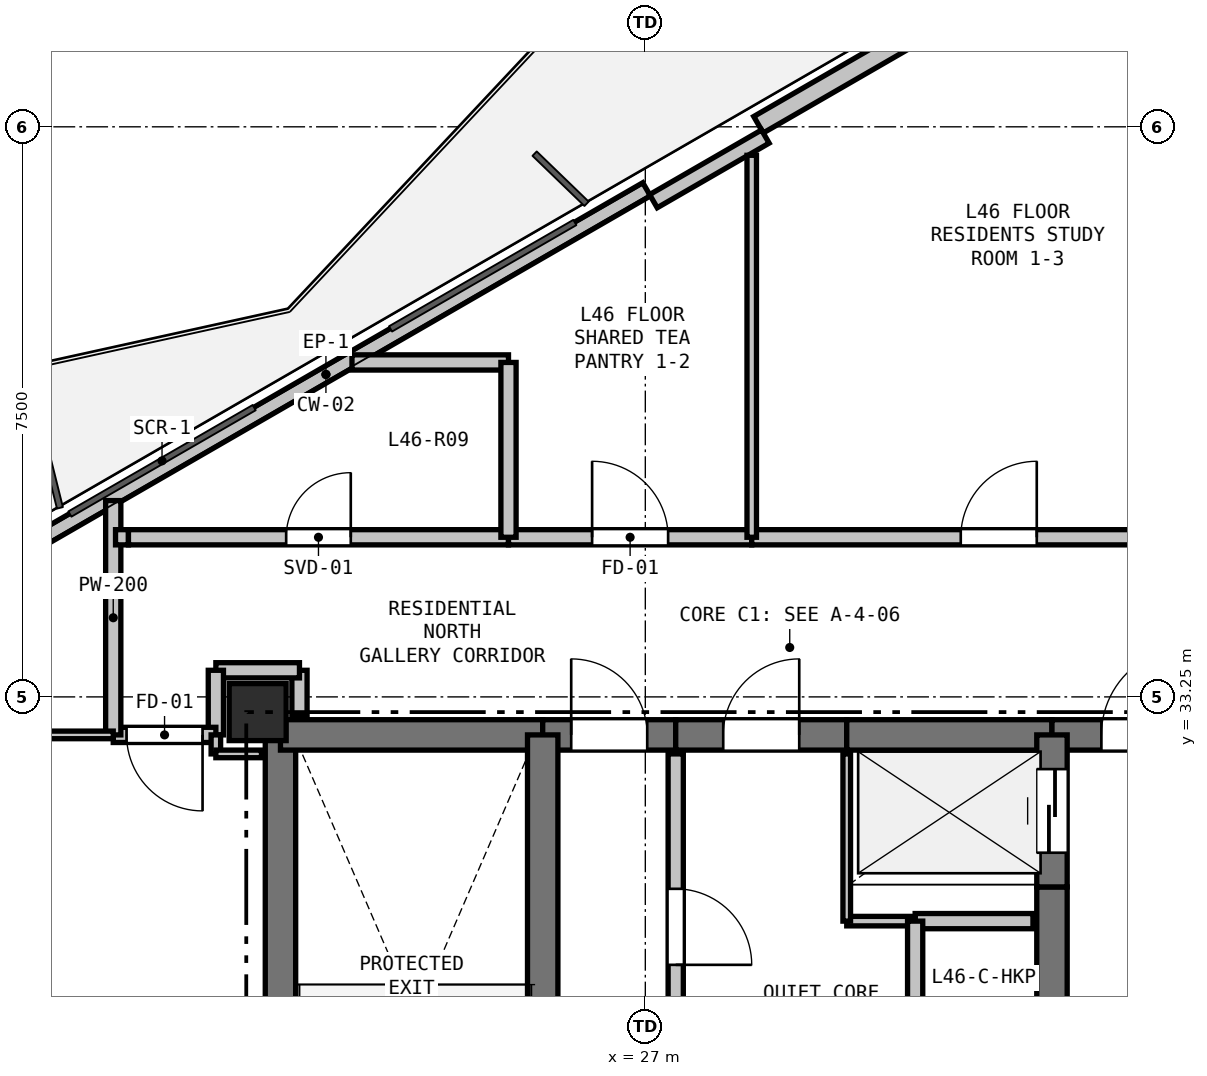
"""IFC4 building model, lengths in metres.
Left out: names, types, materials, properties, quantities, classifications, styles, units other than length and angle.
Written with IfcOpenShell. Run it as: python <this file> out.ifc"""

import sys

from ifc_helpers import new_model, si_unit, direction, frame, frame_2d, origin, origin_2d, place, context, subcontext, project, spatial, rectangle, extrude, element, fill, save


model = new_model("IFC4")
c1 = context("Model", 3, precision=1e-05, world=origin(), true_north=direction((0.0, 1.0)))
c2 = subcontext(c1, "Body", "Model", "MODEL_VIEW")
j1 = project(units=[si_unit("LENGTHUNIT", "METRE"), si_unit("PLANEANGLEUNIT", "RADIAN")], contexts=[c1])
p1 = place(None, origin())
s1 = spatial("IfcSite", under=j1, at=p1, CompositionType="ELEMENT")
p2 = place(p1, origin())
s2 = spatial("IfcBuilding", under=s1, at=p2, CompositionType="ELEMENT")
p3 = place(p2, frame((0.0, 0.0, 167.4)))
s3 = spatial("IfcBuildingStorey", under=s2, at=p3, CompositionType="ELEMENT", Elevation=167.4)
p4 = place(p3, frame((21.9, 33.05, 0.0), z_axis=(0.0, 0.0, 1.0), x_axis=(1.0, 0.0, 0.0)))
e1 = element("IfcColumn", 1, at=p4, inside=s3, PredefinedType="COLUMN", context=c2, shape_type="SweptSolid", body=[
    extrude(rectangle(XDim=0.75, YDim=0.75, at=origin_2d()), origin(), (0.0, 0.0, 1.0), 3.3),
])
p5 = place(p3, frame((18.58, 35.056, 0.0), z_axis=(0.0, 0.0, 1.0), x_axis=(0.866026169916, 0.499998673018, 0.0)))
e2 = element("IfcWall", 2, at=p5, inside=s3, PredefinedType="PARAPET", context=c2, shape_type="SweptSolid", body=[
    extrude(rectangle(XDim=9.742, YDim=0.2, at=frame_2d((4.871, 0.0))), origin(), (0.0, 0.0, 1.0), 0.2),
])
p6 = place(p3, frame((28.489, 40.778, 0.0), z_axis=(0.0, 0.0, 1.0), x_axis=(0.866027516296, 0.499996341005, 0.0)))
e3 = element("IfcWall", 3, at=p6, inside=s3, PredefinedType="SOLIDWALL", context=c2, shape_type="SweptSolid", body=[
    extrude(rectangle(XDim=10.442, YDim=0.25, at=frame_2d((5.221, 0.0))), origin(), (0.0, 0.0, 1.0), 2.64),
])
p7 = place(p6, frame((2.588, 0.0, 0.9)))
e4 = element("IfcOpeningElement", 4, at=p7, cuts=e3, PredefinedType="OPENING", context=c2, shape_type="SweptSolid", body=[
    extrude(rectangle(XDim=1.2, YDim=1.5, at=frame_2d((0.6, 0.75))), frame((0.0, 0.135, 0.0), z_axis=(0.0, -1.0, 0.0), x_axis=(1.0, 0.0, 0.0)), (0.0, 0.0, 1.0), 0.27),
])
p8 = place(p3, frame((27.107, 39.772, 0.0), z_axis=(0.0, 0.0, 1.0), x_axis=(0.866087547558, 0.499892348375, 0.0)))
e5 = element("IfcWall", 5, at=p8, inside=s3, PredefinedType="PARAPET", context=c2, shape_type="SweptSolid", body=[
    extrude(rectangle(XDim=1.7, YDim=0.2, at=frame_2d((0.85, 0.0))), origin(), (0.0, 0.0, 1.0), 2.64),
])
p9 = place(p3, frame((22.2, 25.4, 0.0), z_axis=(0.0, 0.0, 1.0), x_axis=(0.0, 1.0, 0.0)))
e6 = element("IfcWall", 6, at=p9, inside=s3, PredefinedType="SHEAR", context=c2, shape_type="SweptSolid", body=[
    extrude(rectangle(XDim=7.35, YDim=0.4, at=frame_2d((3.675, 0.0))), origin(), (0.0, 0.0, 1.0), 3.02),
])
p10 = place(p3, frame((22.2, 32.75, 0.0), z_axis=(0.0, 0.0, 1.0), x_axis=(1.0, 0.0, 0.0)))
e7 = element("IfcWall", 7, at=p10, inside=s3, PredefinedType="SHEAR", context=c2, shape_type="SweptSolid", body=[
    extrude(rectangle(XDim=3.45, YDim=0.4, at=frame_2d((1.725, 0.0))), origin(), (0.0, 0.0, 1.0), 3.02),
])
p11 = place(p3, frame((25.65, 32.75, 0.0), z_axis=(0.0, 0.0, 1.0), x_axis=(1.0, 0.0, 0.0)))
e8 = element("IfcWall", 8, at=p11, inside=s3, PredefinedType="SHEAR", context=c2, shape_type="SweptSolid", body=[
    extrude(rectangle(XDim=1.75, YDim=0.4, at=frame_2d((0.875, 0.0))), origin(), (0.0, 0.0, 1.0), 3.02),
])
p12 = place(p11, frame((0.375, 0.0, 0.0)))
e9 = element("IfcOpeningElement", 9, at=p12, cuts=e8, PredefinedType="OPENING", context=c2, shape_type="SweptSolid", body=[
    extrude(rectangle(XDim=1.0, YDim=2.15, at=frame_2d((0.5, 1.075))), frame((0.0, 0.21, 0.0), z_axis=(0.0, -1.0, 0.0), x_axis=(1.0, 0.0, 0.0)), (0.0, 0.0, 1.0), 0.42),
])
p13 = place(p3, frame((27.4, 32.75, 0.0), z_axis=(0.0, 0.0, 1.0), x_axis=(1.0, 0.0, 0.0)))
e10 = element("IfcWall", 10, at=p13, inside=s3, PredefinedType="SHEAR", context=c2, shape_type="SweptSolid", body=[
    extrude(rectangle(XDim=2.25, YDim=0.4, at=frame_2d((1.125, 0.0))), origin(), (0.0, 0.0, 1.0), 3.02),
])
p14 = place(p13, frame((0.625, 0.0, 0.0)))
e11 = element("IfcOpeningElement", 11, at=p14, cuts=e10, PredefinedType="OPENING", context=c2, shape_type="SweptSolid", body=[
    extrude(rectangle(XDim=1.0, YDim=2.15, at=frame_2d((0.5, 1.075))), frame((0.0, 0.21, 0.0), z_axis=(0.0, -1.0, 0.0), x_axis=(1.0, 0.0, 0.0)), (0.0, 0.0, 1.0), 0.42),
])
p15 = place(p3, frame((29.65, 32.75, 0.0), z_axis=(0.0, 0.0, 1.0), x_axis=(1.0, 0.0, 0.0)))
e12 = element("IfcWall", 12, at=p15, inside=s3, PredefinedType="SHEAR", context=c2, shape_type="SweptSolid", body=[
    extrude(rectangle(XDim=2.7, YDim=0.4, at=frame_2d((1.35, 0.0))), origin(), (0.0, 0.0, 1.0), 3.02),
])
p16 = place(p3, frame((32.35, 32.75, 0.0), z_axis=(0.0, 0.0, 1.0), x_axis=(1.0, 0.0, 0.0)))
e13 = element("IfcWall", 13, at=p16, inside=s3, PredefinedType="SHEAR", context=c2, shape_type="SweptSolid", body=[
    extrude(rectangle(XDim=3.45, YDim=0.4, at=frame_2d((1.725, 0.0))), origin(), (0.0, 0.0, 1.0), 3.02),
])
p17 = place(p16, frame((0.65, 0.0, 0.0)))
e14 = element("IfcOpeningElement", 14, at=p17, cuts=e13, PredefinedType="OPENING", context=c2, shape_type="SweptSolid", body=[
    extrude(rectangle(XDim=1.15, YDim=2.15, at=frame_2d((0.575, 1.075))), frame((0.0, 0.21, 0.0), z_axis=(0.0, -1.0, 0.0), x_axis=(1.0, 0.0, 0.0)), (0.0, 0.0, 1.0), 0.42),
])
p18 = place(p3, frame((25.65, 27.95, 0.0), z_axis=(0.0, 0.0, 1.0), x_axis=(0.0, 1.0, 0.0)))
e15 = element("IfcWall", 15, at=p18, inside=s3, PredefinedType="SHEAR", context=c2, shape_type="SweptSolid", body=[
    extrude(rectangle(XDim=4.8, YDim=0.4, at=frame_2d((2.4, 0.0))), origin(), (0.0, 0.0, 1.0), 3.02),
])
p19 = place(p3, frame((32.35, 27.95, 0.0), z_axis=(0.0, 0.0, 1.0), x_axis=(0.0, 1.0, 0.0)))
e16 = element("IfcWall", 16, at=p19, inside=s3, PredefinedType="SHEAR", context=c2, shape_type="SweptSolid", body=[
    extrude(rectangle(XDim=2.8, YDim=0.4, at=frame_2d((1.4, 0.0))), origin(), (0.0, 0.0, 1.0), 3.02),
])
p20 = place(p3, frame((32.35, 30.75, 0.0), z_axis=(0.0, 0.0, 1.0), x_axis=(0.0, 1.0, 0.0)))
e17 = element("IfcWall", 17, at=p20, inside=s3, PredefinedType="SHEAR", context=c2, shape_type="SweptSolid", body=[
    extrude(rectangle(XDim=2.0, YDim=0.4, at=frame_2d((1.0, 0.0))), origin(), (0.0, 0.0, 1.0), 3.02),
])
p21 = place(p20, frame((0.45, 0.0, 0.0)))
e18 = element("IfcOpeningElement", 18, at=p21, cuts=e17, PredefinedType="OPENING", context=c2, shape_type="SweptSolid", body=[
    extrude(rectangle(XDim=1.1, YDim=2.15, at=frame_2d((0.55, 1.075))), frame((0.0, 0.21, 0.0), z_axis=(0.0, -1.0, 0.0), x_axis=(1.0, 0.0, 0.0)), (0.0, 0.0, 1.0), 0.42),
])
p22 = place(p3, frame((32.1, 30.3, 0.0), z_axis=(0.0, 0.0, 1.0), x_axis=(-1.0, 0.0, 0.0)))
e19 = element("IfcWall", 19, at=p22, inside=s3, PredefinedType="PARTITIONING", context=c2, shape_type="SweptSolid", body=[
    extrude(rectangle(XDim=1.55, YDim=0.2, at=frame_2d((0.775, 0.0))), origin(), (0.0, 0.0, 1.0), 3.02),
])
p23 = place(p3, frame((30.55, 30.3, 0.0), z_axis=(0.0, 0.0, 1.0), x_axis=(-1.0, 0.0, 0.0)))
e20 = element("IfcWall", 20, at=p23, inside=s3, PredefinedType="PARTITIONING", context=c2, shape_type="SweptSolid", body=[
    extrude(rectangle(XDim=0.9, YDim=0.125, at=frame_2d((0.45, 0.0))), origin(), (0.0, 0.0, 1.0), 3.02),
])
p24 = place(p3, frame((29.65, 30.3, 0.0), z_axis=(0.0, 0.0, 1.0), x_axis=(0.0, 1.0, 0.0)))
e21 = element("IfcWall", 21, at=p24, inside=s3, PredefinedType="PARTITIONING", context=c2, shape_type="SweptSolid", body=[
    extrude(rectangle(XDim=2.2, YDim=0.1, at=frame_2d((1.1, 0.0))), origin(), (0.0, 0.0, 1.0), 3.02),
])
p25 = place(p3, frame((27.4, 32.5, 0.0), z_axis=(0.0, 0.0, 1.0), x_axis=(0.0, -1.0, 0.0)))
e22 = element("IfcWall", 22, at=p25, inside=s3, PredefinedType="PARTITIONING", context=c2, shape_type="SweptSolid", body=[
    extrude(rectangle(XDim=4.55, YDim=0.2, at=frame_2d((2.275, 0.0))), origin(), (0.0, 0.0, 1.0), 3.02),
])
p26 = place(p25, frame((1.775, 0.0, 0.0)))
e23 = element("IfcOpeningElement", 23, at=p26, cuts=e22, PredefinedType="OPENING", context=c2, shape_type="SweptSolid", body=[
    extrude(rectangle(XDim=1.0, YDim=2.15, at=frame_2d((0.5, 1.075))), frame((0.0, 0.11, 0.0), z_axis=(0.0, -1.0, 0.0), x_axis=(1.0, 0.0, 0.0)), (0.0, 0.0, 1.0), 0.22),
])
p27 = place(p3, frame((22.45, 33.0, 0.0), z_axis=(0.0, 0.0, 1.0), x_axis=(0.0, 1.0, 0.0)))
e24 = element("IfcWall", 24, at=p27, inside=s3, PredefinedType="PARTITIONING", context=c2, shape_type="SweptSolid", body=[
    extrude(rectangle(XDim=0.6, YDim=0.2, at=frame_2d((0.3, 0.0))), origin(), (0.0, 0.0, 1.0), 2.545),
])
p28 = place(p3, frame((22.45, 33.6, 0.0), z_axis=(0.0, 0.0, 1.0), x_axis=(-1.0, 0.0, 0.0)))
e25 = element("IfcWall", 25, at=p28, inside=s3, PredefinedType="PARTITIONING", context=c2, shape_type="SweptSolid", body=[
    extrude(rectangle(XDim=1.1, YDim=0.2, at=frame_2d((0.55, 0.0))), origin(), (0.0, 0.0, 1.0), 3.02),
])
p29 = place(p3, frame((21.35, 33.6, 0.0), z_axis=(0.0, 0.0, 1.0), x_axis=(0.0, -1.0, 0.0)))
e26 = element("IfcWall", 26, at=p29, inside=s3, PredefinedType="PARTITIONING", context=c2, shape_type="SweptSolid", body=[
    extrude(rectangle(XDim=0.85, YDim=0.2, at=frame_2d((0.425, 0.0))), origin(), (0.0, 0.0, 1.0), 2.469),
])
p30 = place(p3, frame((21.35, 32.75, 0.0), z_axis=(0.0, 0.0, 1.0), x_axis=(-1.0, 0.0, 0.0)))
e27 = element("IfcWall", 27, at=p30, inside=s3, PredefinedType="PARTITIONING", context=c2, shape_type="SweptSolid", body=[
    extrude(rectangle(XDim=1.35, YDim=0.2, at=frame_2d((0.675, 0.0))), origin(), (0.0, 0.0, 1.0), 2.469),
])
p31 = place(p30, frame((0.175, 0.0, 0.0)))
e28 = element("IfcOpeningElement", 28, at=p31, cuts=e27, PredefinedType="OPENING", context=c2, shape_type="SweptSolid", body=[
    extrude(rectangle(XDim=1.0, YDim=2.15, at=frame_2d((0.5, 1.075))), frame((0.0, 0.11, 0.0), z_axis=(0.0, -1.0, 0.0), x_axis=(1.0, 0.0, 0.0)), (0.0, 0.0, 1.0), 0.22),
])
p32 = place(p3, frame((20.0, 32.75, 0.0), z_axis=(0.0, 0.0, 1.0), x_axis=(0.0, 1.0, 0.0)))
e29 = element("IfcWall", 29, at=p32, inside=s3, PredefinedType="PARTITIONING", context=c2, shape_type="SweptSolid", body=[
    extrude(rectangle(XDim=3.083, YDim=0.2, at=frame_2d((1.541, 0.0))), origin(), (0.0, 0.0, 1.0), 2.365),
])
p33 = place(p3, frame((20.03, 35.35, 0.0), z_axis=(0.0, 0.0, 1.0), x_axis=(1.0, 0.0, 0.0)))
e30 = element("IfcWall", 30, at=p33, inside=s3, PredefinedType="PARTITIONING", context=c2, shape_type="SweptSolid", body=[
    extrude(rectangle(XDim=0.17, YDim=0.2, at=frame_2d((0.085, 0.0))), origin(), (0.0, 0.0, 1.0), 2.365),
])
p34 = place(p3, frame((20.2, 35.35, 0.0), z_axis=(0.0, 0.0, 1.0), x_axis=(1.0, 0.0, 0.0)))
e31 = element("IfcWall", 31, at=p34, inside=s3, PredefinedType="PARTITIONING", context=c2, shape_type="SweptSolid", body=[
    extrude(rectangle(XDim=5.0, YDim=0.2, at=frame_2d((2.5, 0.0))), origin(), (0.0, 0.0, 1.0), 2.365),
])
p35 = place(p34, frame((2.075, 0.0, 0.0)))
e32 = element("IfcOpeningElement", 32, at=p35, cuts=e31, PredefinedType="OPENING", context=c2, shape_type="SweptSolid", body=[
    extrude(rectangle(XDim=0.85, YDim=2.1, at=frame_2d((0.425, 1.05))), frame((0.0, 0.11, 0.0), z_axis=(0.0, -1.0, 0.0), x_axis=(1.0, 0.0, 0.0)), (0.0, 0.0, 1.0), 0.22),
])
p36 = place(p3, frame((25.2, 35.35, 0.0), z_axis=(0.0, 0.0, 1.0), x_axis=(1.0, 0.0, 0.0)))
e33 = element("IfcWall", 33, at=p36, inside=s3, PredefinedType="PARTITIONING", context=c2, shape_type="SweptSolid", body=[
    extrude(rectangle(XDim=3.2, YDim=0.2, at=frame_2d((1.6, 0.0))), origin(), (0.0, 0.0, 1.0), 3.02),
])
p37 = place(p36, frame((1.1, 0.0, 0.0)))
e34 = element("IfcOpeningElement", 34, at=p37, cuts=e33, PredefinedType="OPENING", context=c2, shape_type="SweptSolid", body=[
    extrude(rectangle(XDim=1.0, YDim=2.15, at=frame_2d((0.5, 1.075))), frame((0.0, 0.11, 0.0), z_axis=(0.0, -1.0, 0.0), x_axis=(1.0, 0.0, 0.0)), (0.0, 0.0, 1.0), 0.22),
])
p38 = place(p3, frame((28.4, 35.35, 0.0), z_axis=(0.0, 0.0, 1.0), x_axis=(1.0, 0.0, 0.0)))
e35 = element("IfcWall", 35, at=p38, inside=s3, PredefinedType="PARTITIONING", context=c2, shape_type="SweptSolid", body=[
    extrude(rectangle(XDim=6.5, YDim=0.2, at=frame_2d((3.25, 0.0))), origin(), (0.0, 0.0, 1.0), 3.02),
])
p39 = place(p38, frame((2.75, 0.0, 0.0)))
e36 = element("IfcOpeningElement", 36, at=p39, cuts=e35, PredefinedType="OPENING", context=c2, shape_type="SweptSolid", body=[
    extrude(rectangle(XDim=1.0, YDim=2.15, at=frame_2d((0.5, 1.075))), frame((0.0, 0.11, 0.0), z_axis=(0.0, -1.0, 0.0), x_axis=(1.0, 0.0, 0.0)), (0.0, 0.0, 1.0), 0.22),
])
p40 = place(p3, frame((30.55, 30.3, 0.0), z_axis=(0.0, 0.0, 1.0), x_axis=(0.0, -1.0, 0.0)))
e37 = element("IfcWall", 37, at=p40, inside=s3, PredefinedType="PARTITIONING", context=c2, shape_type="SweptSolid", body=[
    extrude(rectangle(XDim=2.35, YDim=0.2, at=frame_2d((1.175, 0.0))), origin(), (0.0, 0.0, 1.0), 3.02),
])
p41 = place(p3, frame((14.855, 32.75, 0.0), z_axis=(0.0, 0.0, 1.0), x_axis=(1.0, 0.0, 0.0)))
e38 = element("IfcWall", 38, at=p41, inside=s3, PredefinedType="PARTITIONING", context=c2, shape_type="SweptSolid", body=[
    extrude(rectangle(XDim=5.145, YDim=0.1, at=frame_2d((2.572, 0.0))), origin(), (0.0, 0.0, 1.0), 2.365),
])
p42 = place(p3, frame((21.35, 32.75, 0.0), z_axis=(0.0, 0.0, 1.0), x_axis=(0.0, -1.0, 0.0)))
e39 = element("IfcWall", 39, at=p42, inside=s3, PredefinedType="PARTITIONING", context=c2, shape_type="SweptSolid", body=[
    extrude(rectangle(XDim=0.25, YDim=0.125, at=frame_2d((0.125, 0.0))), origin(), (0.0, 0.0, 1.0), 3.02),
])
p43 = place(p3, frame((21.35, 32.5, 0.0), z_axis=(0.0, 0.0, 1.0), x_axis=(1.0, 0.0, 0.0)))
e40 = element("IfcWall", 40, at=p43, inside=s3, PredefinedType="PARTITIONING", context=c2, shape_type="SweptSolid", body=[
    extrude(rectangle(XDim=0.6, YDim=0.1, at=frame_2d((0.3, 0.0))), origin(), (0.0, 0.0, 1.0), 2.545),
])
p44 = place(p3, frame((23.141, 37.65, 0.0), z_axis=(0.0, 0.0, 1.0), x_axis=(1.0, 0.0, 0.0)))
e41 = element("IfcWall", 41, at=p44, inside=s3, PredefinedType="PARTITIONING", context=c2, shape_type="SweptSolid", body=[
    extrude(rectangle(XDim=2.059, YDim=0.2, at=frame_2d((1.03, 0.0))), origin(), (0.0, 0.0, 1.0), 2.365),
])
p45 = place(p3, frame((25.2, 37.65, 0.0), z_axis=(0.0, 0.0, 1.0), x_axis=(0.0, -1.0, 0.0)))
e42 = element("IfcWall", 42, at=p45, inside=s3, PredefinedType="PARTITIONING", context=c2, shape_type="SweptSolid", body=[
    extrude(rectangle(XDim=2.3, YDim=0.2, at=frame_2d((1.15, 0.0))), origin(), (0.0, 0.0, 1.0), 3.02),
])
p46 = place(p3, frame((28.4, 40.375, 0.0), z_axis=(0.0, 0.0, 1.0), x_axis=(0.0, -1.0, 0.0)))
e43 = element("IfcWall", 43, at=p46, inside=s3, PredefinedType="PARTITIONING", context=c2, shape_type="SweptSolid", body=[
    extrude(rectangle(XDim=5.025, YDim=0.125, at=frame_2d((2.513, 0.0))), origin(), (0.0, 0.0, 1.0), 2.365),
])
p47 = place(p12, origin())
e44 = element("IfcDoor", 44, at=p47, inside=s3, OperationType="SINGLE_SWING_LEFT", PredefinedType="DOOR", context=c2, shape_type="SweptSolid", body=[
    extrude(rectangle(XDim=1.0, YDim=2.15, at=frame_2d((0.5, 1.075))), frame((0.0, 0.025, 0.0), z_axis=(0.0, -1.0, 0.0), x_axis=(1.0, 0.0, 0.0)), (0.0, 0.0, 1.0), 0.05),
])
fill(e9, e44)
p48 = place(p21, origin())
e45 = element("IfcDoor", 45, at=p48, inside=s3, OperationType="SLIDING_TO_LEFT", PredefinedType="DOOR", context=c2, shape_type="SweptSolid", body=[
    extrude(rectangle(XDim=1.1, YDim=2.15, at=frame_2d((0.55, 1.075))), frame((0.0, 0.025, 0.0), z_axis=(0.0, -1.0, 0.0), x_axis=(1.0, 0.0, 0.0)), (0.0, 0.0, 1.0), 0.05),
])
fill(e18, e45)
p49 = place(p17, origin())
e46 = element("IfcDoor", 46, at=p49, inside=s3, OperationType="SINGLE_SWING_RIGHT", PredefinedType="DOOR", context=c2, shape_type="SweptSolid", body=[
    extrude(rectangle(XDim=1.15, YDim=2.15, at=frame_2d((0.575, 1.075))), frame((0.0, 0.025, 0.0), z_axis=(0.0, -1.0, 0.0), x_axis=(1.0, 0.0, 0.0)), (0.0, 0.0, 1.0), 0.05),
])
fill(e14, e46)
p50 = place(p26, origin())
e47 = element("IfcDoor", 47, at=p50, inside=s3, OperationType="SINGLE_SWING_RIGHT", PredefinedType="DOOR", context=c2, shape_type="SweptSolid", body=[
    extrude(rectangle(XDim=1.0, YDim=2.15, at=frame_2d((0.5, 1.075))), frame((0.0, 0.025, 0.0), z_axis=(0.0, -1.0, 0.0), x_axis=(1.0, 0.0, 0.0)), (0.0, 0.0, 1.0), 0.05),
])
fill(e23, e47)
p51 = place(p14, origin())
e48 = element("IfcDoor", 48, at=p51, inside=s3, OperationType="SINGLE_SWING_RIGHT", PredefinedType="DOOR", context=c2, shape_type="SweptSolid", body=[
    extrude(rectangle(XDim=1.0, YDim=2.15, at=frame_2d((0.5, 1.075))), frame((0.0, 0.025, 0.0), z_axis=(0.0, -1.0, 0.0), x_axis=(1.0, 0.0, 0.0)), (0.0, 0.0, 1.0), 0.05),
])
fill(e11, e48)
p52 = place(p31, origin())
e49 = element("IfcDoor", 49, at=p52, inside=s3, OperationType="SINGLE_SWING_LEFT", PredefinedType="DOOR", context=c2, shape_type="SweptSolid", body=[
    extrude(rectangle(XDim=1.0, YDim=2.15, at=frame_2d((0.5, 1.075))), frame((0.0, 0.025, 0.0), z_axis=(0.0, -1.0, 0.0), x_axis=(1.0, 0.0, 0.0)), (0.0, 0.0, 1.0), 0.05),
])
fill(e28, e49)
p53 = place(p35, origin())
e50 = element("IfcDoor", 50, at=p53, inside=s3, OperationType="SINGLE_SWING_RIGHT", PredefinedType="DOOR", context=c2, shape_type="SweptSolid", body=[
    extrude(rectangle(XDim=0.85, YDim=2.1, at=frame_2d((0.425, 1.05))), frame((0.0, 0.025, 0.0), z_axis=(0.0, -1.0, 0.0), x_axis=(1.0, 0.0, 0.0)), (0.0, 0.0, 1.0), 0.05),
])
fill(e32, e50)
p54 = place(p37, origin())
e51 = element("IfcDoor", 51, at=p54, inside=s3, OperationType="SINGLE_SWING_LEFT", PredefinedType="DOOR", context=c2, shape_type="SweptSolid", body=[
    extrude(rectangle(XDim=1.0, YDim=2.15, at=frame_2d((0.5, 1.075))), frame((0.0, 0.025, 0.0), z_axis=(0.0, -1.0, 0.0), x_axis=(1.0, 0.0, 0.0)), (0.0, 0.0, 1.0), 0.05),
])
fill(e34, e51)
p55 = place(p39, origin())
e52 = element("IfcDoor", 52, at=p55, inside=s3, OperationType="SINGLE_SWING_RIGHT", PredefinedType="DOOR", context=c2, shape_type="SweptSolid", body=[
    extrude(rectangle(XDim=1.0, YDim=2.15, at=frame_2d((0.5, 1.075))), frame((0.0, 0.025, 0.0), z_axis=(0.0, -1.0, 0.0), x_axis=(1.0, 0.0, 0.0)), (0.0, 0.0, 1.0), 0.05),
])
fill(e36, e52)
save(model, sys.argv[1])
